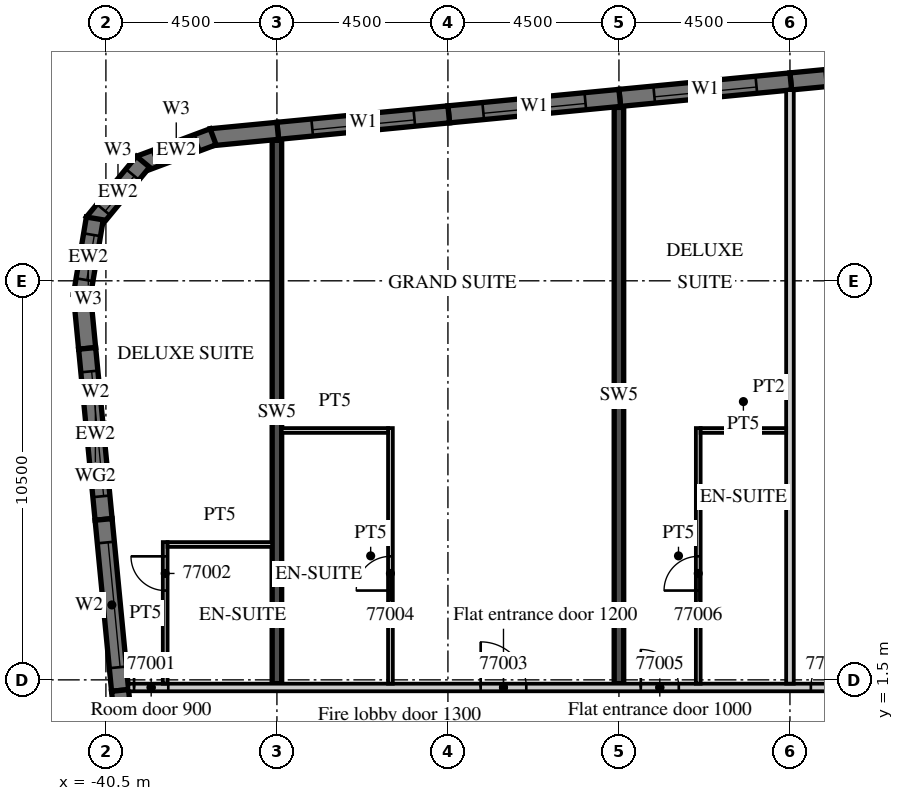
"""IFC4 building model, lengths in metres.
Left out: names, types, materials, properties, quantities, classifications, styles, units other than length and angle.
Written with IfcOpenShell. Run it as: python <this file> out.ifc"""

import sys

from ifc_helpers import new_model, si_unit, direction, frame, frame_2d, origin, place, context, subcontext, project, spatial, polyline, rectangle, outline, extrude, element, fill, save


model = new_model("IFC4")
c1 = context("Model", 3, precision=1e-05, world=origin(), true_north=direction((0.0, 1.0)))
c2 = subcontext(c1, "Body", "Model", "MODEL_VIEW")
j1 = project(units=[si_unit("LENGTHUNIT", "METRE"), si_unit("PLANEANGLEUNIT", "RADIAN")], contexts=[c1])
p1 = place(None, origin())
s1 = spatial("IfcSite", under=j1, at=p1, CompositionType="ELEMENT")
p2 = place(p1, origin())
s2 = spatial("IfcBuilding", under=s1, at=p2, CompositionType="ELEMENT")
p3 = place(p2, frame((0.0, 0.0, 304.8)))
s3 = spatial("IfcBuildingStorey", under=s2, at=p3, CompositionType="ELEMENT", Elevation=304.8)
p4 = place(p3, frame((-36.0, 1.4, 0.0), z_axis=(0.0, 0.0, 1.0), x_axis=(0.0, 1.0, 0.0)))
e1 = element("IfcWall", 1, at=p4, inside=s3, PredefinedType="SHEAR", context=c2, shape_type="SweptSolid", body=[
    extrude(rectangle(XDim=14.296, YDim=0.25, at=frame_2d((7.148, 0.0))), origin(), (0.0, 0.0, 1.0), 3.3),
])
p5 = place(p3, frame((-27.0, 1.4, 0.0), z_axis=(0.0, 0.0, 1.0), x_axis=(0.0, 1.0, 0.0)))
e2 = element("IfcWall", 2, at=p5, inside=s3, PredefinedType="SHEAR", context=c2, shape_type="SweptSolid", body=[
    extrude(rectangle(XDim=15.163, YDim=0.25, at=frame_2d((7.582, 0.0))), origin(), (0.0, 0.0, 1.0), 3.3),
])
p6 = place(p3, frame((-41.132, 11.658, 0.0), z_axis=(0.0, 0.0, 1.0), x_axis=(0.095767215156, -0.995403757528, 0.0)))
e3 = element("IfcWall", 3, at=p6, inside=s3, PredefinedType="SOLIDWALL", context=c2, shape_type="SweptSolid", body=[
    extrude(rectangle(XDim=1.443, YDim=0.45, at=frame_2d((0.721, 0.0))), origin(), (0.0, 0.0, 1.0), 2.9),
])
p7 = place(p3, frame((-40.994, 10.222, 0.0), z_axis=(0.0, 0.0, 1.0), x_axis=(0.095851315644, -0.995395662684, 0.0)))
e4 = element("IfcWall", 4, at=p7, inside=s3, PredefinedType="SOLIDWALL", context=c2, shape_type="SweptSolid", body=[
    extrude(rectangle(XDim=4.521, YDim=0.45, at=frame_2d((2.26, 0.0))), origin(), (0.0, 0.0, 1.0), 2.9),
])
p8 = place(p7, frame((0.61, 0.0, 0.45)))
e5 = element("IfcOpeningElement", 5, at=p8, cuts=e4, PredefinedType="OPENING", context=c2, shape_type="SweptSolid", body=[
    extrude(rectangle(XDim=3.3, YDim=2.25, at=frame_2d((1.65, 1.125))), frame((0.0, 0.235, 0.0), z_axis=(0.0, -1.0, 0.0), x_axis=(1.0, 0.0, 0.0)), (0.0, 0.0, 1.0), 0.47),
])
p9 = place(p3, frame((-40.561, 5.721, 0.0), z_axis=(0.0, 0.0, 1.0), x_axis=(0.095856468129, -0.995395166513, 0.0)))
e6 = element("IfcWall", 6, at=p9, inside=s3, PredefinedType="SOLIDWALL", context=c2, shape_type="SweptSolid", body=[
    extrude(rectangle(XDim=4.521, YDim=0.45, at=frame_2d((2.26, 0.0))), origin(), (0.0, 0.0, 1.0), 2.9),
])
p10 = place(p9, frame((0.61, 0.0, 0.45)))
e7 = element("IfcOpeningElement", 7, at=p10, cuts=e6, PredefinedType="OPENING", context=c2, shape_type="SweptSolid", body=[
    extrude(rectangle(XDim=3.3, YDim=2.25, at=frame_2d((1.65, 1.125))), frame((0.0, 0.235, 0.0), z_axis=(0.0, -1.0, 0.0), x_axis=(1.0, 0.0, 0.0)), (0.0, 0.0, 1.0), 0.47),
])
p11 = place(p3, frame((-40.127, 1.221, 0.0), z_axis=(0.0, 0.0, 1.0), x_axis=(0.095893776162, -0.995391573047, 0.0)))
e8 = element("IfcWall", 8, at=p11, inside=s3, PredefinedType="SOLIDWALL", context=c2, shape_type="SweptSolid", body=[
    extrude(rectangle(XDim=2.411, YDim=0.45, at=frame_2d((1.206, 0.0))), origin(), (0.0, 0.0, 1.0), 2.9),
])
p12 = place(p3, frame((-17.979, 17.68, 0.0), z_axis=(0.0, 0.0, 1.0), x_axis=(-0.995395166513, -0.095856468129, 0.0)))
e9 = element("IfcWall", 9, at=p12, inside=s3, PredefinedType="SOLIDWALL", context=c2, shape_type="SweptSolid", body=[
    extrude(rectangle(XDim=4.521, YDim=0.45, at=frame_2d((2.26, 0.0))), origin(), (0.0, 0.0, 1.0), 2.9),
])
p13 = place(p12, frame((0.91, 0.0, 0.45)))
e10 = element("IfcOpeningElement", 10, at=p13, cuts=e9, PredefinedType="OPENING", context=c2, shape_type="SweptSolid", body=[
    extrude(rectangle(XDim=2.7, YDim=2.25, at=frame_2d((1.35, 1.125))), frame((0.0, 0.235, 0.0), z_axis=(0.0, -1.0, 0.0), x_axis=(1.0, 0.0, 0.0)), (0.0, 0.0, 1.0), 0.47),
])
p14 = place(p3, frame((-22.479, 17.246, 0.0), z_axis=(0.0, 0.0, 1.0), x_axis=(-0.995400317863, -0.09580296028, 0.0)))
e11 = element("IfcWall", 11, at=p14, inside=s3, PredefinedType="SOLIDWALL", context=c2, shape_type="SweptSolid", body=[
    extrude(rectangle(XDim=4.521, YDim=0.45, at=frame_2d((2.26, 0.0))), origin(), (0.0, 0.0, 1.0), 2.9),
])
p15 = place(p14, frame((0.91, 0.0, 0.45)))
e12 = element("IfcOpeningElement", 12, at=p15, cuts=e11, PredefinedType="OPENING", context=c2, shape_type="SweptSolid", body=[
    extrude(rectangle(XDim=2.7, YDim=2.25, at=frame_2d((1.35, 1.125))), frame((0.0, 0.235, 0.0), z_axis=(0.0, -1.0, 0.0), x_axis=(1.0, 0.0, 0.0)), (0.0, 0.0, 1.0), 0.47),
])
p16 = place(p3, frame((-26.979, 16.813, 0.0), z_axis=(0.0, 0.0, 1.0), x_axis=(-0.995394670263, -0.095861621166, 0.0)))
e13 = element("IfcWall", 13, at=p16, inside=s3, PredefinedType="SOLIDWALL", context=c2, shape_type="SweptSolid", body=[
    extrude(rectangle(XDim=4.521, YDim=0.45, at=frame_2d((2.26, 0.0))), origin(), (0.0, 0.0, 1.0), 2.9),
])
p17 = place(p16, frame((0.91, 0.0, 0.45)))
e14 = element("IfcOpeningElement", 14, at=p17, cuts=e13, PredefinedType="OPENING", context=c2, shape_type="SweptSolid", body=[
    extrude(rectangle(XDim=2.7, YDim=2.25, at=frame_2d((1.35, 1.125))), frame((0.0, 0.235, 0.0), z_axis=(0.0, -1.0, 0.0), x_axis=(1.0, 0.0, 0.0)), (0.0, 0.0, 1.0), 0.47),
])
p18 = place(p3, frame((-31.478, 16.38, 0.0), z_axis=(0.0, 0.0, 1.0), x_axis=(-0.995395166513, -0.095856468129, 0.0)))
e15 = element("IfcWall", 15, at=p18, inside=s3, PredefinedType="SOLIDWALL", context=c2, shape_type="SweptSolid", body=[
    extrude(rectangle(XDim=4.521, YDim=0.45, at=frame_2d((2.26, 0.0))), origin(), (0.0, 0.0, 1.0), 2.9),
])
p19 = place(p18, frame((0.91, 0.0, 0.45)))
e16 = element("IfcOpeningElement", 16, at=p19, cuts=e15, PredefinedType="OPENING", context=c2, shape_type="SweptSolid", body=[
    extrude(rectangle(XDim=2.7, YDim=2.25, at=frame_2d((1.35, 1.125))), frame((0.0, 0.235, 0.0), z_axis=(0.0, -1.0, 0.0), x_axis=(1.0, 0.0, 0.0)), (0.0, 0.0, 1.0), 0.47),
])
p20 = place(p3, frame((-35.978, 15.947, 0.0), z_axis=(0.0, 0.0, 1.0), x_axis=(-0.995402442812, -0.095780879321, 0.0)))
e17 = element("IfcWall", 17, at=p20, inside=s3, PredefinedType="SOLIDWALL", context=c2, shape_type="SweptSolid", body=[
    extrude(rectangle(XDim=1.766, YDim=0.45, at=frame_2d((0.883, 0.0))), origin(), (0.0, 0.0, 1.0), 2.9),
])
p21 = place(p3, frame((-37.679, 15.791, 0.0), z_axis=(0.0, 0.0, 1.0), x_axis=(-0.936677599948, -0.350192909346, 0.0)))
e18 = element("IfcWall", 18, at=p21, inside=s3, PredefinedType="SOLIDWALL", context=c2, shape_type="SweptSolid", body=[
    extrude(outline(polyline([(0.0, -0.225), (2.071, -0.225), (1.95, 0.225), (0.121, 0.225), (0.0, -0.225)])), origin(), (0.0, 0.0, 1.0), 2.9),
])
p22 = place(p21, frame((0.435, 0.0, 0.45)))
e19 = element("IfcOpeningElement", 19, at=p22, cuts=e18, PredefinedType="OPENING", context=c2, shape_type="SweptSolid", body=[
    extrude(rectangle(XDim=1.2, YDim=2.25, at=frame_2d((0.6, 1.125))), frame((0.0, 0.235, 0.0), z_axis=(0.0, -1.0, 0.0), x_axis=(1.0, 0.0, 0.0)), (0.0, 0.0, 1.0), 0.47),
])
p23 = place(p3, frame((-39.524, 15.133, 0.0), z_axis=(0.0, 0.0, 1.0), x_axis=(-0.636046112757, -0.771651049663, 0.0)))
e20 = element("IfcWall", 20, at=p23, inside=s3, PredefinedType="SOLIDWALL", context=c2, shape_type="SweptSolid", body=[
    extrude(outline(polyline([(0.0, -0.225), (2.071, -0.225), (1.95, 0.225), (0.121, 0.225), (0.0, -0.225)])), origin(), (0.0, 0.0, 1.0), 2.9),
])
p24 = place(p23, frame((0.435, 0.0, 0.45)))
e21 = element("IfcOpeningElement", 21, at=p24, cuts=e20, PredefinedType="OPENING", context=c2, shape_type="SweptSolid", body=[
    extrude(rectangle(XDim=1.2, YDim=2.25, at=frame_2d((0.6, 1.125))), frame((0.0, 0.235, 0.0), z_axis=(0.0, -1.0, 0.0), x_axis=(1.0, 0.0, 0.0)), (0.0, 0.0, 1.0), 0.47),
])
p25 = place(p3, frame((-40.792, 13.641, 0.0), z_axis=(0.0, 0.0, 1.0), x_axis=(-0.165068144653, -0.986282164302, 0.0)))
e22 = element("IfcWall", 22, at=p25, inside=s3, PredefinedType="SOLIDWALL", context=c2, shape_type="SweptSolid", body=[
    extrude(outline(polyline([(0.0, -0.225), (2.071, -0.225), (1.95, 0.225), (0.121, 0.225), (0.0, -0.225)])), origin(), (0.0, 0.0, 1.0), 2.9),
])
p26 = place(p25, frame((0.435, 0.0, 0.45)))
e23 = element("IfcOpeningElement", 23, at=p26, cuts=e22, PredefinedType="OPENING", context=c2, shape_type="SweptSolid", body=[
    extrude(rectangle(XDim=1.2, YDim=2.25, at=frame_2d((0.6, 1.125))), frame((0.0, 0.235, 0.0), z_axis=(0.0, -1.0, 0.0), x_axis=(1.0, 0.0, 0.0)), (0.0, 0.0, 1.0), 0.47),
])
p27 = place(p3, frame((-39.909, 1.3, 0.0), z_axis=(0.0, 0.0, 1.0), x_axis=(1.0, 0.0, 0.0)))
e24 = element("IfcWall", 24, at=p27, inside=s3, PredefinedType="PARTITIONING", context=c2, shape_type="SweptSolid", body=[
    extrude(rectangle(XDim=53.409, YDim=0.2, at=frame_2d((26.705, 0.0))), origin(), (0.0, 0.0, 1.0), 2.9),
])
p28 = place(p27, frame((0.15, 0.0, 0.0)))
e25 = element("IfcOpeningElement", 25, at=p28, cuts=e24, PredefinedType="OPENING", context=c2, shape_type="SweptSolid", body=[
    extrude(rectangle(XDim=0.9, YDim=2.1, at=frame_2d((0.45, 1.05))), frame((0.0, 0.11, 0.0), z_axis=(0.0, -1.0, 0.0), x_axis=(1.0, 0.0, 0.0)), (0.0, 0.0, 1.0), 0.22),
])
p29 = place(p27, frame((9.271, 0.0, 0.0)))
e26 = element("IfcOpeningElement", 26, at=p29, cuts=e24, PredefinedType="OPENING", context=c2, shape_type="SweptSolid", body=[
    extrude(rectangle(XDim=1.2, YDim=2.1, at=frame_2d((0.6, 1.05))), frame((0.0, 0.11, 0.0), z_axis=(0.0, -1.0, 0.0), x_axis=(1.0, 0.0, 0.0)), (0.0, 0.0, 1.0), 0.22),
])
p30 = place(p27, frame((13.484, 0.0, 0.0)))
e27 = element("IfcOpeningElement", 27, at=p30, cuts=e24, PredefinedType="OPENING", context=c2, shape_type="SweptSolid", body=[
    extrude(rectangle(XDim=1.0, YDim=2.1, at=frame_2d((0.5, 1.05))), frame((0.0, 0.11, 0.0), z_axis=(0.0, -1.0, 0.0), x_axis=(1.0, 0.0, 0.0)), (0.0, 0.0, 1.0), 0.22),
])
p31 = place(p27, frame((17.959, 0.0, 0.0)))
e28 = element("IfcOpeningElement", 28, at=p31, cuts=e24, PredefinedType="OPENING", context=c2, shape_type="SweptSolid", body=[
    extrude(rectangle(XDim=1.0, YDim=2.1, at=frame_2d((0.5, 1.05))), frame((0.0, 0.11, 0.0), z_axis=(0.0, -1.0, 0.0), x_axis=(1.0, 0.0, 0.0)), (0.0, 0.0, 1.0), 0.22),
])
p32 = place(p27, frame((24.859, 0.0, 0.0)))
e29 = element("IfcOpeningElement", 29, at=p32, cuts=e24, PredefinedType="OPENING", context=c2, shape_type="SweptSolid", body=[
    extrude(rectangle(XDim=1.0, YDim=2.1, at=frame_2d((0.5, 1.05))), frame((0.0, 0.11, 0.0), z_axis=(0.0, -1.0, 0.0), x_axis=(1.0, 0.0, 0.0)), (0.0, 0.0, 1.0), 0.22),
])
p33 = place(p27, frame((29.334, 0.0, 0.0)))
e30 = element("IfcOpeningElement", 30, at=p33, cuts=e24, PredefinedType="OPENING", context=c2, shape_type="SweptSolid", body=[
    extrude(rectangle(XDim=1.0, YDim=2.1, at=frame_2d((0.5, 1.05))), frame((0.0, 0.11, 0.0), z_axis=(0.0, -1.0, 0.0), x_axis=(1.0, 0.0, 0.0)), (0.0, 0.0, 1.0), 0.22),
])
p34 = place(p27, frame((36.271, 0.0, 0.0)))
e31 = element("IfcOpeningElement", 31, at=p34, cuts=e24, PredefinedType="OPENING", context=c2, shape_type="SweptSolid", body=[
    extrude(rectangle(XDim=1.2, YDim=2.1, at=frame_2d((0.6, 1.05))), frame((0.0, 0.11, 0.0), z_axis=(0.0, -1.0, 0.0), x_axis=(1.0, 0.0, 0.0)), (0.0, 0.0, 1.0), 0.22),
])
p35 = place(p27, frame((40.484, 0.0, 0.0)))
e32 = element("IfcOpeningElement", 32, at=p35, cuts=e24, PredefinedType="OPENING", context=c2, shape_type="SweptSolid", body=[
    extrude(rectangle(XDim=1.0, YDim=2.1, at=frame_2d((0.5, 1.05))), frame((0.0, 0.11, 0.0), z_axis=(0.0, -1.0, 0.0), x_axis=(1.0, 0.0, 0.0)), (0.0, 0.0, 1.0), 0.22),
])
p36 = place(p27, frame((47.334, 0.0, 0.0)))
e33 = element("IfcOpeningElement", 33, at=p36, cuts=e24, PredefinedType="OPENING", context=c2, shape_type="SweptSolid", body=[
    extrude(rectangle(XDim=1.0, YDim=2.1, at=frame_2d((0.5, 1.05))), frame((0.0, 0.11, 0.0), z_axis=(0.0, -1.0, 0.0), x_axis=(1.0, 0.0, 0.0)), (0.0, 0.0, 1.0), 0.22),
])
p37 = place(p27, frame((51.834, 0.0, 0.0)))
e34 = element("IfcOpeningElement", 34, at=p37, cuts=e24, PredefinedType="OPENING", context=c2, shape_type="SweptSolid", body=[
    extrude(rectangle(XDim=1.0, YDim=2.1, at=frame_2d((0.5, 1.05))), frame((0.0, 0.11, 0.0), z_axis=(0.0, -1.0, 0.0), x_axis=(1.0, 0.0, 0.0)), (0.0, 0.0, 1.0), 0.22),
])
p38 = place(p3, frame((-38.94, 1.4, 0.0), z_axis=(0.0, 0.0, 1.0), x_axis=(0.0, 1.0, 0.0)))
e35 = element("IfcWall", 35, at=p38, inside=s3, PredefinedType="PARTITIONING", context=c2, shape_type="SweptSolid", body=[
    extrude(rectangle(XDim=3.725, YDim=0.125, at=frame_2d((1.863, 0.0))), origin(), (0.0, 0.0, 1.0), 2.9),
])
p39 = place(p38, frame((2.45, 0.0, 0.0)))
e36 = element("IfcOpeningElement", 36, at=p39, cuts=e35, PredefinedType="OPENING", context=c2, shape_type="SweptSolid", body=[
    extrude(rectangle(XDim=0.9, YDim=2.1, at=frame_2d((0.45, 1.05))), frame((0.0, 0.073, 0.0), z_axis=(0.0, -1.0, 0.0), x_axis=(1.0, 0.0, 0.0)), (0.0, 0.0, 1.0), 0.145),
])
p40 = place(p3, frame((-38.878, 5.062, 0.0), z_axis=(0.0, 0.0, 1.0), x_axis=(1.0, 0.0, 0.0)))
e37 = element("IfcWall", 37, at=p40, inside=s3, PredefinedType="PARTITIONING", context=c2, shape_type="SweptSolid", body=[
    extrude(rectangle(XDim=2.753, YDim=0.125, at=frame_2d((1.376, 0.0))), origin(), (0.0, 0.0, 1.0), 2.9),
])
p41 = place(p3, frame((-33.013, 1.4, 0.0), z_axis=(0.0, 0.0, 1.0), x_axis=(0.0, 1.0, 0.0)))
e38 = element("IfcWall", 38, at=p41, inside=s3, PredefinedType="PARTITIONING", context=c2, shape_type="SweptSolid", body=[
    extrude(rectangle(XDim=6.725, YDim=0.125, at=frame_2d((3.363, 0.0))), origin(), (0.0, 0.0, 1.0), 2.9),
])
p42 = place(p41, frame((2.45, 0.0, 0.0)))
e39 = element("IfcOpeningElement", 39, at=p42, cuts=e38, PredefinedType="OPENING", context=c2, shape_type="SweptSolid", body=[
    extrude(rectangle(XDim=0.9, YDim=2.1, at=frame_2d((0.45, 1.05))), frame((0.0, 0.073, 0.0), z_axis=(0.0, -1.0, 0.0), x_axis=(1.0, 0.0, 0.0)), (0.0, 0.0, 1.0), 0.145),
])
p43 = place(p3, frame((-35.875, 8.062, 0.0), z_axis=(0.0, 0.0, 1.0), x_axis=(1.0, 0.0, 0.0)))
e40 = element("IfcWall", 40, at=p43, inside=s3, PredefinedType="PARTITIONING", context=c2, shape_type="SweptSolid", body=[
    extrude(rectangle(XDim=2.8, YDim=0.125, at=frame_2d((1.4, 0.0))), origin(), (0.0, 0.0, 1.0), 2.9),
])
p44 = place(p3, frame((-22.5, 1.4, 0.0), z_axis=(0.0, 0.0, 1.0), x_axis=(0.0, 1.0, 0.0)))
e41 = element("IfcWall", 41, at=p44, inside=s3, PredefinedType="PARTITIONING", context=c2, shape_type="SweptSolid", body=[
    extrude(rectangle(XDim=15.618, YDim=0.2, at=frame_2d((7.809, 0.0))), origin(), (0.0, 0.0, 1.0), 2.9),
])
p45 = place(p3, frame((-24.913, 1.4, 0.0), z_axis=(0.0, 0.0, 1.0), x_axis=(0.0, 1.0, 0.0)))
e42 = element("IfcWall", 42, at=p45, inside=s3, PredefinedType="PARTITIONING", context=c2, shape_type="SweptSolid", body=[
    extrude(rectangle(XDim=6.725, YDim=0.125, at=frame_2d((3.363, 0.0))), origin(), (0.0, 0.0, 1.0), 2.9),
])
p46 = place(p45, frame((2.45, 0.0, 0.0)))
e43 = element("IfcOpeningElement", 43, at=p46, cuts=e42, PredefinedType="OPENING", context=c2, shape_type="SweptSolid", body=[
    extrude(rectangle(XDim=0.9, YDim=2.1, at=frame_2d((0.45, 1.05))), frame((0.0, 0.073, 0.0), z_axis=(0.0, -1.0, 0.0), x_axis=(1.0, 0.0, 0.0)), (0.0, 0.0, 1.0), 0.145),
])
p47 = place(p3, frame((-24.85, 8.062, 0.0), z_axis=(0.0, 0.0, 1.0), x_axis=(1.0, 0.0, 0.0)))
e44 = element("IfcWall", 44, at=p47, inside=s3, PredefinedType="PARTITIONING", context=c2, shape_type="SweptSolid", body=[
    extrude(rectangle(XDim=2.25, YDim=0.125, at=frame_2d((1.125, 0.0))), origin(), (0.0, 0.0, 1.0), 2.9),
])
p48 = place(p8, origin())
e45 = element("IfcWindow", 45, at=p48, inside=s3, PartitioningType="SINGLE_PANEL", PredefinedType="WINDOW", context=c2, shape_type="SweptSolid", body=[
    extrude(rectangle(XDim=3.3, YDim=2.25, at=frame_2d((1.65, 1.125))), frame((0.0, 0.09, 0.0), z_axis=(0.0, -1.0, 0.0), x_axis=(1.0, 0.0, 0.0)), (0.0, 0.0, 1.0), 0.06),
])
fill(e5, e45)
p49 = place(p10, origin())
e46 = element("IfcWindow", 46, at=p49, inside=s3, PartitioningType="SINGLE_PANEL", PredefinedType="WINDOW", context=c2, shape_type="SweptSolid", body=[
    extrude(rectangle(XDim=3.3, YDim=2.25, at=frame_2d((1.65, 1.125))), frame((0.0, 0.09, 0.0), z_axis=(0.0, -1.0, 0.0), x_axis=(1.0, 0.0, 0.0)), (0.0, 0.0, 1.0), 0.06),
])
fill(e7, e46)
p50 = place(p15, origin())
e47 = element("IfcWindow", 47, at=p50, inside=s3, PartitioningType="SINGLE_PANEL", PredefinedType="WINDOW", context=c2, shape_type="SweptSolid", body=[
    extrude(rectangle(XDim=2.7, YDim=2.25, at=frame_2d((1.35, 1.125))), frame((0.0, 0.09, 0.0), z_axis=(0.0, -1.0, 0.0), x_axis=(1.0, 0.0, 0.0)), (0.0, 0.0, 1.0), 0.06),
])
fill(e12, e47)
p51 = place(p17, origin())
e48 = element("IfcWindow", 48, at=p51, inside=s3, PartitioningType="SINGLE_PANEL", PredefinedType="WINDOW", context=c2, shape_type="SweptSolid", body=[
    extrude(rectangle(XDim=2.7, YDim=2.25, at=frame_2d((1.35, 1.125))), frame((0.0, 0.09, 0.0), z_axis=(0.0, -1.0, 0.0), x_axis=(1.0, 0.0, 0.0)), (0.0, 0.0, 1.0), 0.06),
])
fill(e14, e48)
p52 = place(p19, origin())
e49 = element("IfcWindow", 49, at=p52, inside=s3, PartitioningType="SINGLE_PANEL", PredefinedType="WINDOW", context=c2, shape_type="SweptSolid", body=[
    extrude(rectangle(XDim=2.7, YDim=2.25, at=frame_2d((1.35, 1.125))), frame((0.0, 0.09, 0.0), z_axis=(0.0, -1.0, 0.0), x_axis=(1.0, 0.0, 0.0)), (0.0, 0.0, 1.0), 0.06),
])
fill(e16, e49)
p53 = place(p22, origin())
e50 = element("IfcWindow", 50, at=p53, inside=s3, PartitioningType="SINGLE_PANEL", PredefinedType="WINDOW", context=c2, shape_type="SweptSolid", body=[
    extrude(rectangle(XDim=1.2, YDim=2.25, at=frame_2d((0.6, 1.125))), frame((0.0, 0.09, 0.0), z_axis=(0.0, -1.0, 0.0), x_axis=(1.0, 0.0, 0.0)), (0.0, 0.0, 1.0), 0.06),
])
fill(e19, e50)
p54 = place(p24, origin())
e51 = element("IfcWindow", 51, at=p54, inside=s3, PartitioningType="SINGLE_PANEL", PredefinedType="WINDOW", context=c2, shape_type="SweptSolid", body=[
    extrude(rectangle(XDim=1.2, YDim=2.25, at=frame_2d((0.6, 1.125))), frame((0.0, 0.09, 0.0), z_axis=(0.0, -1.0, 0.0), x_axis=(1.0, 0.0, 0.0)), (0.0, 0.0, 1.0), 0.06),
])
fill(e21, e51)
p55 = place(p26, origin())
e52 = element("IfcWindow", 52, at=p55, inside=s3, PartitioningType="SINGLE_PANEL", PredefinedType="WINDOW", context=c2, shape_type="SweptSolid", body=[
    extrude(rectangle(XDim=1.2, YDim=2.25, at=frame_2d((0.6, 1.125))), frame((0.0, 0.09, 0.0), z_axis=(0.0, -1.0, 0.0), x_axis=(1.0, 0.0, 0.0)), (0.0, 0.0, 1.0), 0.06),
])
fill(e23, e52)
p56 = place(p28, origin())
e53 = element("IfcDoor", 53, at=p56, inside=s3, OperationType="SINGLE_SWING_LEFT", PredefinedType="DOOR", context=c2, shape_type="SweptSolid", body=[
    extrude(rectangle(XDim=0.9, YDim=2.1, at=frame_2d((0.45, 1.05))), frame((0.0, 0.025, 0.0), z_axis=(0.0, -1.0, 0.0), x_axis=(1.0, 0.0, 0.0)), (0.0, 0.0, 1.0), 0.05),
])
fill(e25, e53)
p57 = place(p39, origin())
e54 = element("IfcDoor", 54, at=p57, inside=s3, OperationType="SINGLE_SWING_RIGHT", PredefinedType="DOOR", context=c2, shape_type="SweptSolid", body=[
    extrude(rectangle(XDim=0.9, YDim=2.1, at=frame_2d((0.45, 1.05))), frame((0.0, 0.025, 0.0), z_axis=(0.0, -1.0, 0.0), x_axis=(1.0, 0.0, 0.0)), (0.0, 0.0, 1.0), 0.05),
])
fill(e36, e54)
p58 = place(p29, origin())
e55 = element("IfcDoor", 55, at=p58, inside=s3, OperationType="SINGLE_SWING_LEFT", PredefinedType="DOOR", context=c2, shape_type="SweptSolid", body=[
    extrude(rectangle(XDim=1.2, YDim=2.1, at=frame_2d((0.6, 1.05))), frame((0.0, 0.025, 0.0), z_axis=(0.0, -1.0, 0.0), x_axis=(1.0, 0.0, 0.0)), (0.0, 0.0, 1.0), 0.05),
])
fill(e26, e55)
p59 = place(p42, origin())
e56 = element("IfcDoor", 56, at=p59, inside=s3, OperationType="SINGLE_SWING_LEFT", PredefinedType="DOOR", context=c2, shape_type="SweptSolid", body=[
    extrude(rectangle(XDim=0.9, YDim=2.1, at=frame_2d((0.45, 1.05))), frame((0.0, 0.025, 0.0), z_axis=(0.0, -1.0, 0.0), x_axis=(1.0, 0.0, 0.0)), (0.0, 0.0, 1.0), 0.05),
])
fill(e39, e56)
p60 = place(p30, origin())
e57 = element("IfcDoor", 57, at=p60, inside=s3, OperationType="SINGLE_SWING_LEFT", PredefinedType="DOOR", context=c2, shape_type="SweptSolid", body=[
    extrude(rectangle(XDim=1.0, YDim=2.1, at=frame_2d((0.5, 1.05))), frame((0.0, 0.025, 0.0), z_axis=(0.0, -1.0, 0.0), x_axis=(1.0, 0.0, 0.0)), (0.0, 0.0, 1.0), 0.05),
])
fill(e27, e57)
p61 = place(p46, origin())
e58 = element("IfcDoor", 58, at=p61, inside=s3, OperationType="SINGLE_SWING_LEFT", PredefinedType="DOOR", context=c2, shape_type="SweptSolid", body=[
    extrude(rectangle(XDim=0.9, YDim=2.1, at=frame_2d((0.45, 1.05))), frame((0.0, 0.025, 0.0), z_axis=(0.0, -1.0, 0.0), x_axis=(1.0, 0.0, 0.0)), (0.0, 0.0, 1.0), 0.05),
])
fill(e43, e58)
p62 = place(p31, origin())
e59 = element("IfcDoor", 59, at=p62, inside=s3, OperationType="SINGLE_SWING_RIGHT", PredefinedType="DOOR", context=c2, shape_type="SweptSolid", body=[
    extrude(rectangle(XDim=1.0, YDim=2.1, at=frame_2d((0.5, 1.05))), frame((0.0, 0.025, 0.0), z_axis=(0.0, -1.0, 0.0), x_axis=(1.0, 0.0, 0.0)), (0.0, 0.0, 1.0), 0.05),
])
fill(e28, e59)
save(model, sys.argv[1])
